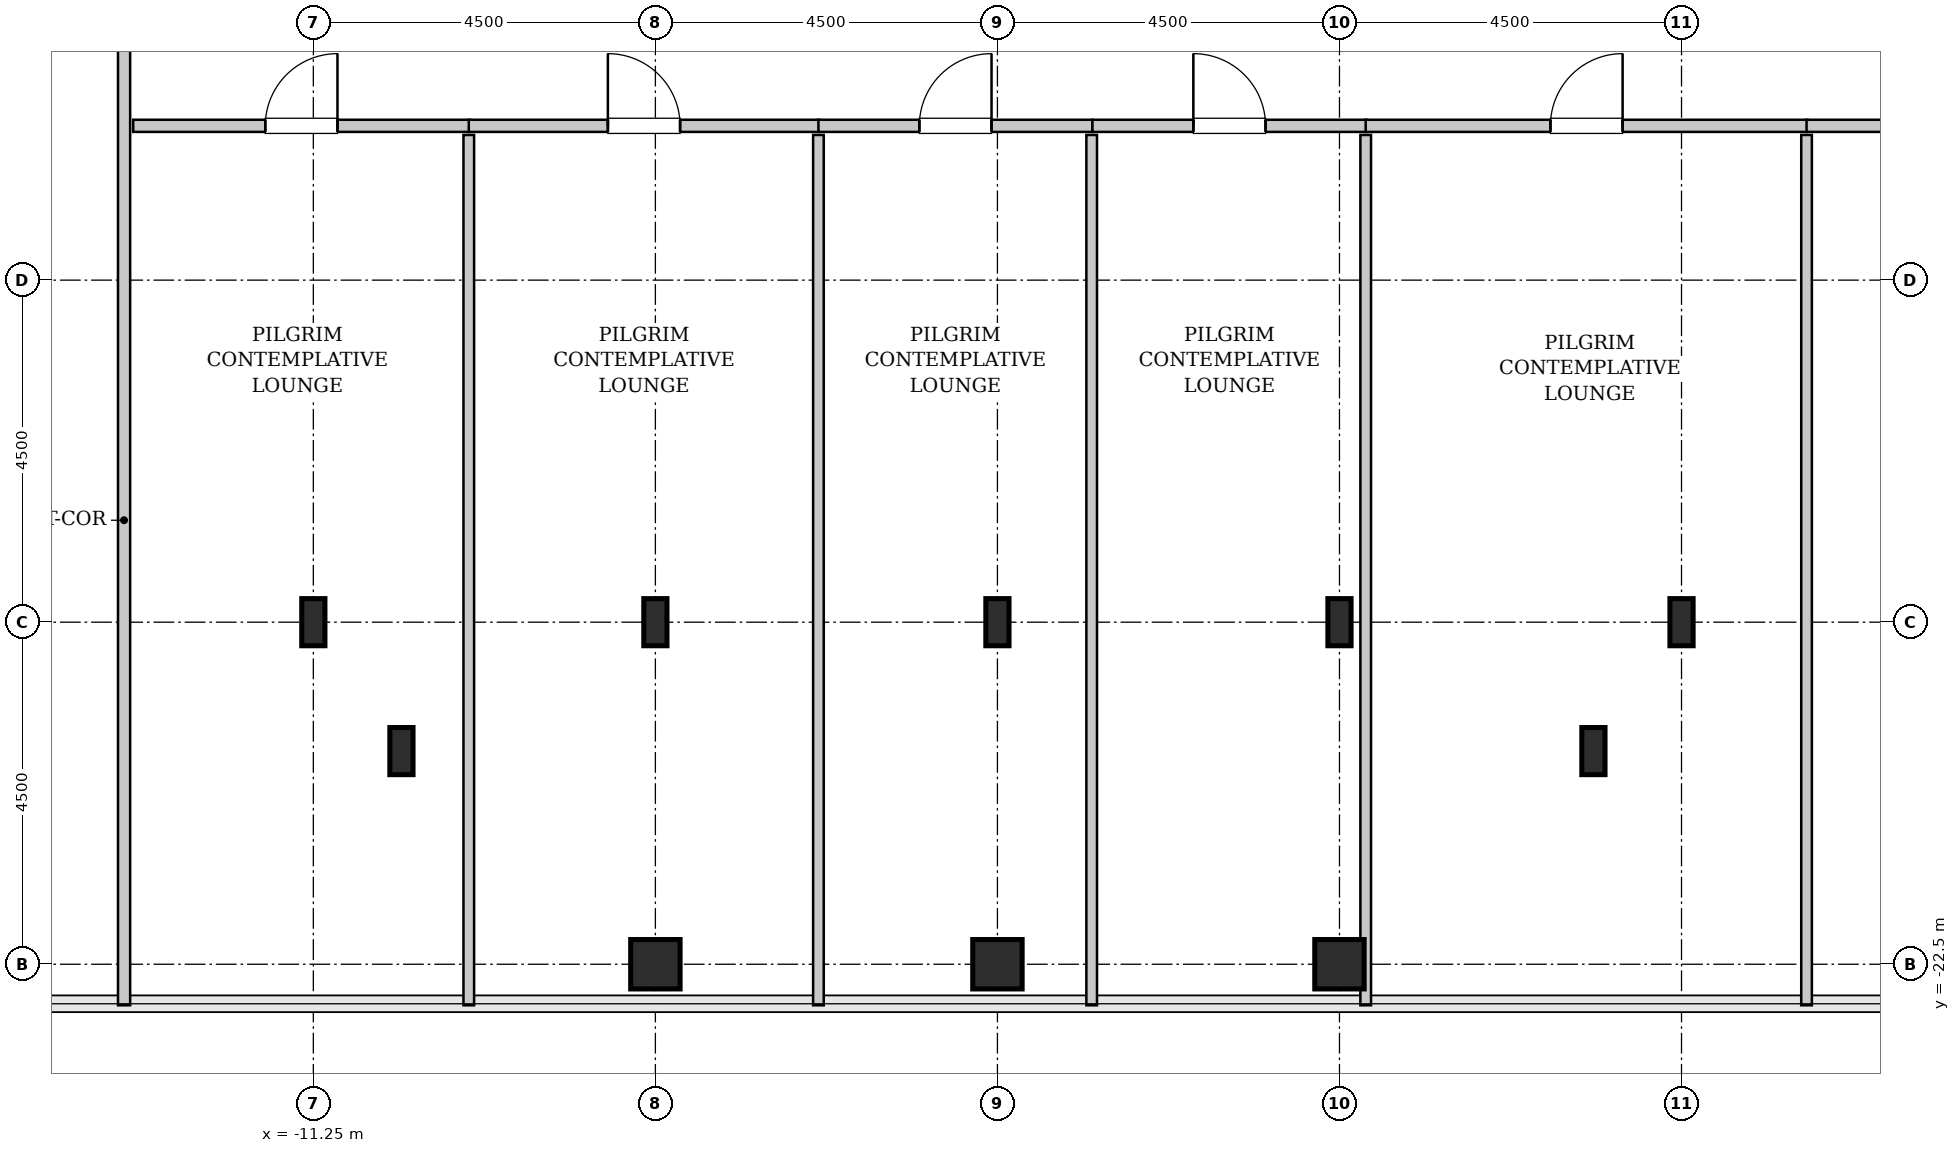
"""IFC4 building model, lengths in metres.
Left out: names, types, materials, properties, quantities, classifications, styles, units other than length and angle.
Written with IfcOpenShell. Run it as: python <this file> out.ifc"""

import sys

from ifc_helpers import new_model, si_unit, direction, frame, frame_2d, origin, origin_2d, place, context, subcontext, project, spatial, rectangle, hollow_rectangle, i_section, extrude, source, transform, mapped, element, fill, save


model = new_model("IFC4")
c1 = context("Model", 3, precision=1e-05, world=origin(), true_north=direction((0.0, 1.0)))
c2 = subcontext(c1, "Body", "Model", "MODEL_VIEW")
j1 = project(units=[si_unit("LENGTHUNIT", "METRE"), si_unit("PLANEANGLEUNIT", "RADIAN")], contexts=[c1])
p1 = place(None, origin())
s1 = spatial("IfcSite", under=j1, at=p1, CompositionType="ELEMENT")
p2 = place(p1, origin())
s2 = spatial("IfcBuilding", under=s1, at=p2, CompositionType="ELEMENT")
p3 = place(p2, frame((0.0, 0.0, 268.4)))
s3 = spatial("IfcBuildingStorey", under=s2, at=p3, CompositionType="ELEMENT", Elevation=268.4)
m1 = source(origin(), c2, "Body", "SweptSolid", [
    extrude(i_section(OverallWidth=0.305, OverallDepth=0.62, WebThickness=0.021, FlangeThickness=0.04, FilletRadius=0.027, at=origin_2d()), origin(), (0.0, 0.0, 1.0), 3.8),
])
for number, where, z_axis, x_axis in (
    (1, (-11.25, -18.0, 0.0), (0.0, 0.0, 1.0), (1.0, 0.0, 0.0)),
    (2, (-10.091, -19.696, 0.0), (0.0, 0.0, 1.0), (1.0, 0.0, 0.0)),
):
    element("IfcColumn", number, at=place(p3, frame(where, z_axis=z_axis, x_axis=x_axis)), inside=s3, PredefinedType="COLUMN", context=c2, shape_type="MappedRepresentation", body=[
        mapped(m1, transform((0.0, 0.0, 0.0), x_axis=(1.0, 0.0, 0.0), y_axis=(0.0, 1.0, 0.0), z_axis=(0.0, 0.0, 1.0), scale=1.0)),
    ])
m2 = source(origin(), c2, "Body", "SweptSolid", [
    extrude(hollow_rectangle(XDim=0.65, YDim=0.65, WallThickness=0.032, InnerFilletRadius=0.032, OuterFilletRadius=0.064, at=origin_2d()), origin(), (0.0, 0.0, 1.0), 3.8),
])
p4 = place(p3, frame((-6.75, -22.5, 0.0), z_axis=(0.0, 0.0, 1.0), x_axis=(1.0, 0.0, 0.0)))
e3 = element("IfcColumn", 3, at=p4, inside=s3, PredefinedType="COLUMN", context=c2, shape_type="MappedRepresentation", body=[
    mapped(m2, transform((0.0, 0.0, 0.0), x_axis=(1.0, 0.0, 0.0), y_axis=(0.0, 1.0, 0.0), z_axis=(0.0, 0.0, 1.0), scale=1.0)),
])
p5 = place(p3, frame((-6.75, -18.0, 0.0), z_axis=(0.0, 0.0, 1.0), x_axis=(1.0, 0.0, 0.0)))
e4 = element("IfcColumn", 4, at=p5, inside=s3, PredefinedType="COLUMN", context=c2, shape_type="MappedRepresentation", body=[
    mapped(m1, transform((0.0, 0.0, 0.0), x_axis=(1.0, 0.0, 0.0), y_axis=(0.0, 1.0, 0.0), z_axis=(0.0, 0.0, 1.0), scale=1.0)),
])
p6 = place(p3, frame((-2.25, -22.5, 0.0), z_axis=(0.0, 0.0, 1.0), x_axis=(1.0, 0.0, 0.0)))
e5 = element("IfcColumn", 5, at=p6, inside=s3, PredefinedType="COLUMN", context=c2, shape_type="MappedRepresentation", body=[
    mapped(m2, transform((0.0, 0.0, 0.0), x_axis=(1.0, 0.0, 0.0), y_axis=(0.0, 1.0, 0.0), z_axis=(0.0, 0.0, 1.0), scale=1.0)),
])
p7 = place(p3, frame((-2.25, -18.0, 0.0), z_axis=(0.0, 0.0, 1.0), x_axis=(1.0, 0.0, 0.0)))
e6 = element("IfcColumn", 6, at=p7, inside=s3, PredefinedType="COLUMN", context=c2, shape_type="MappedRepresentation", body=[
    mapped(m1, transform((0.0, 0.0, 0.0), x_axis=(1.0, 0.0, 0.0), y_axis=(0.0, 1.0, 0.0), z_axis=(0.0, 0.0, 1.0), scale=1.0)),
])
p8 = place(p3, frame((2.25, -22.5, 0.0), z_axis=(0.0, 0.0, 1.0), x_axis=(1.0, 0.0, 0.0)))
e7 = element("IfcColumn", 7, at=p8, inside=s3, PredefinedType="COLUMN", context=c2, shape_type="MappedRepresentation", body=[
    mapped(m2, transform((0.0, 0.0, 0.0), x_axis=(1.0, 0.0, 0.0), y_axis=(0.0, 1.0, 0.0), z_axis=(0.0, 0.0, 1.0), scale=1.0)),
])
for number, where, z_axis, x_axis in (
    (8, (2.25, -18.0, 0.0), (0.0, 0.0, 1.0), (1.0, 0.0, 0.0)),
    (9, (5.591, -19.696, 0.0), (0.0, 0.0, 1.0), (1.0, 0.0, 0.0)),
    (10, (6.75, -18.0, 0.0), (0.0, 0.0, 1.0), (1.0, 0.0, 0.0)),
):
    element("IfcColumn", number, at=place(p3, frame(where, z_axis=z_axis, x_axis=x_axis)), inside=s3, PredefinedType="COLUMN", context=c2, shape_type="MappedRepresentation", body=[
        mapped(m1, transform((0.0, 0.0, 0.0), x_axis=(1.0, 0.0, 0.0), y_axis=(0.0, 1.0, 0.0), z_axis=(0.0, 0.0, 1.0), scale=1.0)),
    ])
m3 = source(origin(), c2, "Body", "SweptSolid", [
    extrude(rectangle(XDim=14.845, YDim=0.16, at=frame_2d((7.422, 0.0))), origin(), (0.0, 0.0, 1.0), 3.535),
])
p9 = place(p3, frame((-13.74, -23.04, 0.0), z_axis=(0.0, 0.0, 1.0), x_axis=(0.0, 1.0, 0.0)))
e11 = element("IfcWall", 11, at=p9, inside=s3, PredefinedType="PARTITIONING", context=c2, shape_type="MappedRepresentation", body=[
    mapped(m3, transform((0.0, 0.0, 0.0), x_axis=(1.0, 0.0, 0.0), y_axis=(0.0, 1.0, 0.0), z_axis=(0.0, 0.0, 1.0), scale=1.0)),
])
p10 = place(p9, frame((12.712, 0.0, 0.0)))
e12 = element("IfcOpeningElement", 12, at=p10, cuts=e11, PredefinedType="OPENING", context=c2, shape_type="SweptSolid", body=[
    extrude(rectangle(XDim=0.95, YDim=2.1, at=frame_2d((0.475, 1.05))), frame((0.0, 0.09, 0.0), z_axis=(0.0, -1.0, 0.0), x_axis=(1.0, 0.0, 0.0)), (0.0, 0.0, 1.0), 0.18),
])
m4 = source(origin(), c2, "Body", "SweptSolid", [
    extrude(rectangle(XDim=4.425, YDim=0.16, at=frame_2d((2.212, 0.0))), origin(), (0.0, 0.0, 1.0), 3.535),
])
p11 = place(p3, frame((-13.62, -11.47, 0.0), z_axis=(0.0, 0.0, 1.0), x_axis=(1.0, 0.0, 0.0)))
e13 = element("IfcWall", 13, at=p11, inside=s3, PredefinedType="PARTITIONING", context=c2, shape_type="MappedRepresentation", body=[
    mapped(m4, transform((0.0, 0.0, 0.0), x_axis=(1.0, 0.0, 0.0), y_axis=(0.0, 1.0, 0.0), z_axis=(0.0, 0.0, 1.0), scale=1.0)),
])
p12 = place(p11, frame((1.738, 0.0, 0.0)))
e14 = element("IfcOpeningElement", 14, at=p12, cuts=e13, PredefinedType="OPENING", context=c2, shape_type="SweptSolid", body=[
    extrude(rectangle(XDim=0.95, YDim=2.1, at=frame_2d((0.475, 1.05))), frame((0.0, 0.09, 0.0), z_axis=(0.0, -1.0, 0.0), x_axis=(1.0, 0.0, 0.0)), (0.0, 0.0, 1.0), 0.18),
])
m5 = source(origin(), c2, "Body", "SweptSolid", [
    extrude(rectangle(XDim=11.45, YDim=0.14, at=frame_2d((5.725, 0.0))), origin(), (0.0, 0.0, 1.0), 3.535),
])
p13 = place(p3, frame((-9.205, -23.04, 0.0), z_axis=(0.0, 0.0, 1.0), x_axis=(0.0, 1.0, 0.0)))
e15 = element("IfcWall", 15, at=p13, inside=s3, PredefinedType="PARTITIONING", context=c2, shape_type="MappedRepresentation", body=[
    mapped(m5, transform((0.0, 0.0, 0.0), x_axis=(1.0, 0.0, 0.0), y_axis=(0.0, 1.0, 0.0), z_axis=(0.0, 0.0, 1.0), scale=1.0)),
])
m6 = source(origin(), c2, "Body", "SweptSolid", [
    extrude(rectangle(XDim=4.61, YDim=0.16, at=frame_2d((2.305, 0.0))), origin(), (0.0, 0.0, 1.0), 3.535),
])
p14 = place(p3, frame((-9.205, -11.47, 0.0), z_axis=(0.0, 0.0, 1.0), x_axis=(1.0, 0.0, 0.0)))
e16 = element("IfcWall", 16, at=p14, inside=s3, PredefinedType="PARTITIONING", context=c2, shape_type="MappedRepresentation", body=[
    mapped(m6, transform((0.0, 0.0, 0.0), x_axis=(1.0, 0.0, 0.0), y_axis=(0.0, 1.0, 0.0), z_axis=(0.0, 0.0, 1.0), scale=1.0)),
])
p15 = place(p14, frame((1.83, 0.0, 0.0)))
e17 = element("IfcOpeningElement", 17, at=p15, cuts=e16, PredefinedType="OPENING", context=c2, shape_type="SweptSolid", body=[
    extrude(rectangle(XDim=0.95, YDim=2.1, at=frame_2d((0.475, 1.05))), frame((0.0, 0.09, 0.0), z_axis=(0.0, -1.0, 0.0), x_axis=(1.0, 0.0, 0.0)), (0.0, 0.0, 1.0), 0.18),
])
p16 = place(p3, frame((-4.605, -23.04, 0.0), z_axis=(0.0, 0.0, 1.0), x_axis=(0.0, 1.0, 0.0)))
e18 = element("IfcWall", 18, at=p16, inside=s3, PredefinedType="PARTITIONING", context=c2, shape_type="MappedRepresentation", body=[
    mapped(m5, transform((0.0, 0.0, 0.0), x_axis=(1.0, 0.0, 0.0), y_axis=(0.0, 1.0, 0.0), z_axis=(0.0, 0.0, 1.0), scale=1.0)),
])
m7 = source(origin(), c2, "Body", "SweptSolid", [
    extrude(rectangle(XDim=3.605, YDim=0.16, at=frame_2d((1.802, 0.0))), origin(), (0.0, 0.0, 1.0), 3.535),
])
p17 = place(p3, frame((-4.605, -11.47, 0.0), z_axis=(0.0, 0.0, 1.0), x_axis=(1.0, 0.0, 0.0)))
e19 = element("IfcWall", 19, at=p17, inside=s3, PredefinedType="PARTITIONING", context=c2, shape_type="MappedRepresentation", body=[
    mapped(m7, transform((0.0, 0.0, 0.0), x_axis=(1.0, 0.0, 0.0), y_axis=(0.0, 1.0, 0.0), z_axis=(0.0, 0.0, 1.0), scale=1.0)),
])
p18 = place(p17, frame((1.327, 0.0, 0.0)))
e20 = element("IfcOpeningElement", 20, at=p18, cuts=e19, PredefinedType="OPENING", context=c2, shape_type="SweptSolid", body=[
    extrude(rectangle(XDim=0.95, YDim=2.1, at=frame_2d((0.475, 1.05))), frame((0.0, 0.09, 0.0), z_axis=(0.0, -1.0, 0.0), x_axis=(1.0, 0.0, 0.0)), (0.0, 0.0, 1.0), 0.18),
])
p19 = place(p3, frame((-1.01, -23.04, 0.0), z_axis=(0.0, 0.0, 1.0), x_axis=(0.0, 1.0, 0.0)))
e21 = element("IfcWall", 21, at=p19, inside=s3, PredefinedType="PARTITIONING", context=c2, shape_type="MappedRepresentation", body=[
    mapped(m5, transform((0.0, 0.0, 0.0), x_axis=(1.0, 0.0, 0.0), y_axis=(0.0, 1.0, 0.0), z_axis=(0.0, 0.0, 1.0), scale=1.0)),
])
p20 = place(p3, frame((-1.0, -11.47, 0.0), z_axis=(0.0, 0.0, 1.0), x_axis=(1.0, 0.0, 0.0)))
e22 = element("IfcWall", 22, at=p20, inside=s3, PredefinedType="PARTITIONING", context=c2, shape_type="MappedRepresentation", body=[
    mapped(m7, transform((0.0, 0.0, 0.0), x_axis=(1.0, 0.0, 0.0), y_axis=(0.0, 1.0, 0.0), z_axis=(0.0, 0.0, 1.0), scale=1.0)),
])
p21 = place(p20, frame((1.327, 0.0, 0.0)))
e23 = element("IfcOpeningElement", 23, at=p21, cuts=e22, PredefinedType="OPENING", context=c2, shape_type="SweptSolid", body=[
    extrude(rectangle(XDim=0.95, YDim=2.1, at=frame_2d((0.475, 1.05))), frame((0.0, 0.09, 0.0), z_axis=(0.0, -1.0, 0.0), x_axis=(1.0, 0.0, 0.0)), (0.0, 0.0, 1.0), 0.18),
])
m8 = source(origin(), c2, "Body", "SweptSolid", [
    extrude(rectangle(XDim=11.45, YDim=0.14, at=frame_2d((5.725, 0.0))), origin(), (0.0, 0.0, 1.0), 2.925),
])
p22 = place(p3, frame((2.595, -23.04, 0.0), z_axis=(0.0, 0.0, 1.0), x_axis=(0.0, 1.0, 0.0)))
e24 = element("IfcWall", 24, at=p22, inside=s3, PredefinedType="PARTITIONING", context=c2, shape_type="MappedRepresentation", body=[
    mapped(m8, transform((0.0, 0.0, 0.0), x_axis=(1.0, 0.0, 0.0), y_axis=(0.0, 1.0, 0.0), z_axis=(0.0, 0.0, 1.0), scale=1.0)),
])
m9 = source(origin(), c2, "Body", "SweptSolid", [
    extrude(rectangle(XDim=5.81, YDim=0.16, at=frame_2d((2.905, 0.0))), origin(), (0.0, 0.0, 1.0), 3.535),
])
p23 = place(p3, frame((2.595, -11.47, 0.0), z_axis=(0.0, 0.0, 1.0), x_axis=(1.0, 0.0, 0.0)))
e25 = element("IfcWall", 25, at=p23, inside=s3, PredefinedType="PARTITIONING", context=c2, shape_type="MappedRepresentation", body=[
    mapped(m9, transform((0.0, 0.0, 0.0), x_axis=(1.0, 0.0, 0.0), y_axis=(0.0, 1.0, 0.0), z_axis=(0.0, 0.0, 1.0), scale=1.0)),
])
p24 = place(p23, frame((2.43, 0.0, 0.0)))
e26 = element("IfcOpeningElement", 26, at=p24, cuts=e25, PredefinedType="OPENING", context=c2, shape_type="SweptSolid", body=[
    extrude(rectangle(XDim=0.95, YDim=2.1, at=frame_2d((0.475, 1.05))), frame((0.0, 0.09, 0.0), z_axis=(0.0, -1.0, 0.0), x_axis=(1.0, 0.0, 0.0)), (0.0, 0.0, 1.0), 0.18),
])
p25 = place(p3, frame((8.395, -23.04, 0.0), z_axis=(0.0, 0.0, 1.0), x_axis=(0.0, 1.0, 0.0)))
e27 = element("IfcWall", 27, at=p25, inside=s3, PredefinedType="PARTITIONING", context=c2, shape_type="MappedRepresentation", body=[
    mapped(m5, transform((0.0, 0.0, 0.0), x_axis=(1.0, 0.0, 0.0), y_axis=(0.0, 1.0, 0.0), z_axis=(0.0, 0.0, 1.0), scale=1.0)),
])
m10 = source(origin(), c2, "Body", "SweptSolid", [
    extrude(rectangle(XDim=5.225, YDim=0.16, at=frame_2d((2.613, 0.0))), origin(), (0.0, 0.0, 1.0), 3.535),
])
p26 = place(p3, frame((8.395, -11.47, 0.0), z_axis=(0.0, 0.0, 1.0), x_axis=(1.0, 0.0, 0.0)))
e28 = element("IfcWall", 28, at=p26, inside=s3, PredefinedType="PARTITIONING", context=c2, shape_type="MappedRepresentation", body=[
    mapped(m10, transform((0.0, 0.0, 0.0), x_axis=(1.0, 0.0, 0.0), y_axis=(0.0, 1.0, 0.0), z_axis=(0.0, 0.0, 1.0), scale=1.0)),
])
p27 = place(p26, frame((2.137, 0.0, 0.0)))
e29 = element("IfcOpeningElement", 29, at=p27, cuts=e28, PredefinedType="OPENING", context=c2, shape_type="SweptSolid", body=[
    extrude(rectangle(XDim=0.95, YDim=2.1, at=frame_2d((0.475, 1.05))), frame((0.0, 0.09, 0.0), z_axis=(0.0, -1.0, 0.0), x_axis=(1.0, 0.0, 0.0)), (0.0, 0.0, 1.0), 0.18),
])
m11 = source(origin(), c2, "Body", "SweptSolid", [
    extrude(rectangle(XDim=0.95, YDim=2.1, at=frame_2d((0.475, 1.05))), frame((0.0, 0.025, 0.0), z_axis=(0.0, -1.0, 0.0), x_axis=(1.0, 0.0, 0.0)), (0.0, 0.0, 1.0), 0.05),
])
p28 = place(p12, origin())
e30 = element("IfcDoor", 30, at=p28, inside=s3, OperationType="SINGLE_SWING_RIGHT", PredefinedType="DOOR", context=c2, shape_type="MappedRepresentation", body=[
    mapped(m11, transform((0.0, 0.0, 0.0), x_axis=(1.0, 0.0, 0.0), y_axis=(0.0, 1.0, 0.0), z_axis=(0.0, 0.0, 1.0), scale=1.0)),
])
fill(e14, e30)
p29 = place(p15, origin())
e31 = element("IfcDoor", 31, at=p29, inside=s3, OperationType="SINGLE_SWING_LEFT", PredefinedType="DOOR", context=c2, shape_type="MappedRepresentation", body=[
    mapped(m11, transform((0.0, 0.0, 0.0), x_axis=(1.0, 0.0, 0.0), y_axis=(0.0, 1.0, 0.0), z_axis=(0.0, 0.0, 1.0), scale=1.0)),
])
fill(e17, e31)
p30 = place(p18, origin())
e32 = element("IfcDoor", 32, at=p30, inside=s3, OperationType="SINGLE_SWING_RIGHT", PredefinedType="DOOR", context=c2, shape_type="MappedRepresentation", body=[
    mapped(m11, transform((0.0, 0.0, 0.0), x_axis=(1.0, 0.0, 0.0), y_axis=(0.0, 1.0, 0.0), z_axis=(0.0, 0.0, 1.0), scale=1.0)),
])
fill(e20, e32)
p31 = place(p21, origin())
e33 = element("IfcDoor", 33, at=p31, inside=s3, OperationType="SINGLE_SWING_LEFT", PredefinedType="DOOR", context=c2, shape_type="MappedRepresentation", body=[
    mapped(m11, transform((0.0, 0.0, 0.0), x_axis=(1.0, 0.0, 0.0), y_axis=(0.0, 1.0, 0.0), z_axis=(0.0, 0.0, 1.0), scale=1.0)),
])
fill(e23, e33)
p32 = place(p24, origin())
e34 = element("IfcDoor", 34, at=p32, inside=s3, OperationType="SINGLE_SWING_RIGHT", PredefinedType="DOOR", context=c2, shape_type="MappedRepresentation", body=[
    mapped(m11, transform((0.0, 0.0, 0.0), x_axis=(1.0, 0.0, 0.0), y_axis=(0.0, 1.0, 0.0), z_axis=(0.0, 0.0, 1.0), scale=1.0)),
])
fill(e26, e34)
save(model, sys.argv[1])
